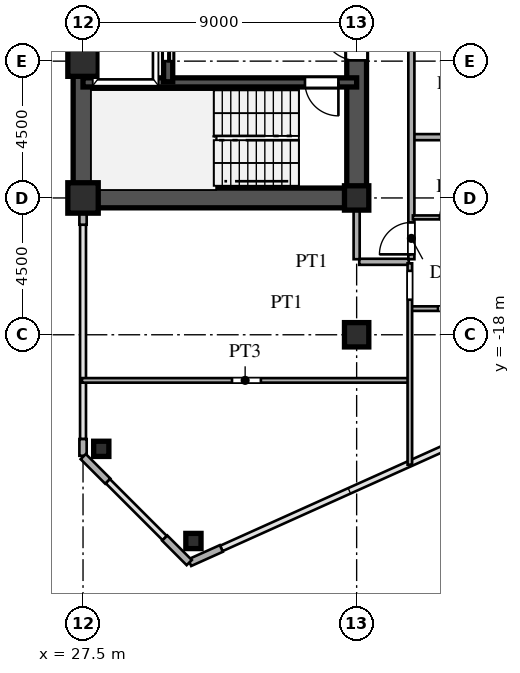
"""IFC4 building model, lengths in metres.
Left out: names, types, materials, properties, quantities, classifications, styles, units other than length and angle.
Written with IfcOpenShell. Run it as: python <this file> out.ifc"""

import sys

from ifc_helpers import new_model, si_unit, direction, frame, frame_2d, origin, origin_2d, place, context, subcontext, project, spatial, rectangle, hollow_rectangle, i_section, extrude, source, transform, mapped, element, fill, save


model = new_model("IFC4")
c1 = context("Model", 3, precision=1e-05, world=origin(), true_north=direction((0.0, 1.0)))
c2 = subcontext(c1, "Body", "Model", "MODEL_VIEW")
j1 = project(units=[si_unit("LENGTHUNIT", "METRE"), si_unit("PLANEANGLEUNIT", "RADIAN")], contexts=[c1])
p1 = place(None, origin())
s1 = spatial("IfcSite", under=j1, at=p1, CompositionType="ELEMENT")
p2 = place(p1, origin())
s2 = spatial("IfcBuilding", under=s1, at=p2, CompositionType="ELEMENT")
p3 = place(p2, frame((0.0, 0.0, 80.1)))
s3 = spatial("IfcBuildingStorey", under=s2, at=p3, CompositionType="ELEMENT", Elevation=80.1)
m1 = source(origin(), c2, "Body", "SweptSolid", [
    extrude(hollow_rectangle(XDim=1.0, YDim=1.0, WallThickness=0.042, at=origin_2d()), origin(), (0.0, 0.0, 1.0), 3.6),
])
for number, where, z_axis, x_axis in (
    (1, (27.5, -13.5, 0.0), (0.0, 0.0, 1.0), (1.0, 0.0, 0.0)),
    (2, (27.5, -9.0, 0.0), (0.0, 0.0, 1.0), (1.0, 0.0, 0.0)),
):
    element("IfcColumn", number, at=place(p3, frame(where, z_axis=z_axis, x_axis=x_axis)), inside=s3, PredefinedType="COLUMN", context=c2, shape_type="MappedRepresentation", body=[
        mapped(m1, transform((0.0, 0.0, 0.0), scale=1.0)),
    ])
m2 = source(origin(), c2, "Body", "SweptSolid", [
    extrude(i_section(OverallWidth=0.8, OverallDepth=0.8, WebThickness=0.032, FlangeThickness=0.05, at=origin_2d()), origin(), (0.0, 0.0, 1.0), 3.6),
])
for number, where, z_axis, x_axis in (
    (3, (36.5, -18.0, 0.0), (0.0, 0.0, 1.0), (1.0, 0.0, 0.0)),
    (4, (36.5, -13.5, 0.0), (0.0, 0.0, 1.0), (1.0, 0.0, 0.0)),
):
    element("IfcColumn", number, at=place(p3, frame(where, z_axis=z_axis, x_axis=x_axis)), inside=s3, PredefinedType="COLUMN", context=c2, shape_type="MappedRepresentation", body=[
        mapped(m2, transform((0.0, 0.0, 0.0), scale=1.0)),
    ])
m3 = source(origin(), c2, "Body", "SweptSolid", [
    extrude(hollow_rectangle(XDim=0.5, YDim=0.5, WallThickness=0.02, at=origin_2d()), origin(), (0.0, 0.0, 1.0), 3.6),
])
for number, where, z_axis, x_axis in (
    (5, (31.131, -24.783, 0.0), (0.0, 0.0, 1.0), (1.0, 0.0, 0.0)),
    (6, (28.1, -21.751, 0.0), (0.0, 0.0, 1.0), (1.0, 0.0, 0.0)),
):
    element("IfcColumn", number, at=place(p3, frame(where, z_axis=z_axis, x_axis=x_axis)), inside=s3, PredefinedType="COLUMN", context=c2, shape_type="MappedRepresentation", body=[
        mapped(m3, transform((0.0, 0.0, 0.0), scale=1.0)),
    ])
p4 = place(p3, frame((31.009, -25.496, 0.0), z_axis=(0.0, 0.0, 1.0), x_axis=(0.911929519623, 0.410346866979, 0.0)))
e7 = element("IfcWall", 7, at=p4, inside=s3, PredefinedType="SOLIDWALL", context=c2, shape_type="SweptSolid", body=[
    extrude(rectangle(XDim=1.14, YDim=0.24, at=frame_2d((0.57, 0.0))), origin(), (0.0, 0.0, 1.0), 3.38),
])
p5 = place(p3, frame((27.5, -21.98, 0.0), z_axis=(0.0, 0.0, 1.0), x_axis=(0.0, 1.0, 0.0)))
e8 = element("IfcWall", 8, at=p5, inside=s3, PredefinedType="SOLIDWALL", context=c2, shape_type="SweptSolid", body=[
    extrude(rectangle(XDim=0.55, YDim=0.24, at=frame_2d((0.275, 0.0))), origin(), (0.0, 0.0, 1.0), 3.38),
])
p6 = place(p3, frame((27.5, -14.38, 0.0), z_axis=(0.0, 0.0, 1.0), x_axis=(0.0, 1.0, 0.0)))
e9 = element("IfcWall", 9, at=p6, inside=s3, PredefinedType="SOLIDWALL", context=c2, shape_type="SweptSolid", body=[
    extrude(rectangle(XDim=0.55, YDim=0.24, at=frame_2d((0.275, 0.0))), origin(), (0.0, 0.0, 1.0), 2.88),
])
for number, where, z_axis, x_axis in (
    (10, (27.507, -22.007, 0.0), (0.0, 0.0, 1.0), (0.707, -0.707, 0.0)),
    (11, (30.187, -24.687, 0.0), (0.0, 0.0, 1.0), (0.707, -0.707, 0.0)),
):
    element("IfcWall", number, at=place(p3, frame(where, z_axis=z_axis, x_axis=x_axis)), inside=s3, PredefinedType="SOLIDWALL", context=c2, shape_type="SweptSolid", body=[
        extrude(rectangle(XDim=1.14, YDim=0.24, at=frame_2d((0.57, 0.0))), origin(), (0.0, 0.0, 1.0), 3.38),
    ])
p7 = place(p3, frame((27.5, -13.5, 0.0), z_axis=(0.0, 0.0, 1.0), x_axis=(0.0, 1.0, 0.0)))
e12 = element("IfcWall", 12, at=p7, inside=s3, PredefinedType="SHEAR", context=c2, shape_type="SweptSolid", body=[
    extrude(rectangle(XDim=12.2, YDim=0.65, at=frame_2d((6.1, 0.0))), origin(), (0.0, 0.0, 1.0), 3.38),
])
p8 = place(p3, frame((27.5, -13.5, 0.0), z_axis=(0.0, 0.0, 1.0), x_axis=(1.0, 0.0, 0.0)))
e13 = element("IfcWall", 13, at=p8, inside=s3, PredefinedType="SHEAR", context=c2, shape_type="SweptSolid", body=[
    extrude(rectangle(XDim=9.0, YDim=0.65, at=frame_2d((4.5, 0.0))), origin(), (0.0, 0.0, 1.0), 3.38),
])
p9 = place(p3, frame((36.5, -13.65, 0.0), z_axis=(0.0, 0.0, 1.0), x_axis=(0.0, 1.0, 0.0)))
e14 = element("IfcWall", 14, at=p9, inside=s3, PredefinedType="SHEAR", context=c2, shape_type="SweptSolid", body=[
    extrude(rectangle(XDim=7.15, YDim=0.65, at=frame_2d((3.575, 0.0))), origin(), (0.0, 0.0, 1.0), 3.38),
])
p10 = place(p9, frame((4.675, 0.0, 0.0)))
e15 = element("IfcOpeningElement", 15, at=p10, cuts=e14, PredefinedType="OPENING", context=c2, shape_type="SweptSolid", body=[
    extrude(rectangle(XDim=1.15, YDim=2.2, at=frame_2d((0.575, 1.1))), frame((0.0, 0.335, 0.0), z_axis=(0.0, -1.0, 0.0), x_axis=(1.0, 0.0, 0.0)), (0.0, 0.0, 1.0), 0.67),
])
p11 = place(p3, frame((27.5, -9.7, 0.0), z_axis=(0.0, 0.0, 1.0), x_axis=(1.0, 0.0, 0.0)))
e16 = element("IfcWall", 16, at=p11, inside=s3, PredefinedType="SHEAR", context=c2, shape_type="SweptSolid", body=[
    extrude(rectangle(XDim=9.0, YDim=0.3, at=frame_2d((4.5, 0.0))), origin(), (0.0, 0.0, 1.0), 3.38),
])
p12 = place(p11, frame((7.3, 0.0, 0.0)))
e17 = element("IfcOpeningElement", 17, at=p12, cuts=e16, PredefinedType="OPENING", context=c2, shape_type="SweptSolid", body=[
    extrude(rectangle(XDim=1.1, YDim=2.2, at=frame_2d((0.55, 1.1))), frame((0.0, 0.16, 0.0), z_axis=(0.0, -1.0, 0.0), x_axis=(1.0, 0.0, 0.0)), (0.0, 0.0, 1.0), 0.32),
])
p13 = place(p3, frame((30.3, -9.68, 0.0), z_axis=(0.0, 0.0, 1.0), x_axis=(0.0, 1.0, 0.0)))
e18 = element("IfcWall", 18, at=p13, inside=s3, PredefinedType="SHEAR", context=c2, shape_type="SweptSolid", body=[
    extrude(rectangle(XDim=2.56, YDim=0.3, at=frame_2d((1.28, 0.0))), origin(), (0.0, 0.0, 1.0), 3.38),
])
p14 = place(p13, frame((0.68, 0.0, 0.0)))
e19 = element("IfcOpeningElement", 19, at=p14, cuts=e18, PredefinedType="OPENING", context=c2, shape_type="SweptSolid", body=[
    extrude(rectangle(XDim=1.2, YDim=2.25, at=frame_2d((0.6, 1.125))), frame((0.0, 0.16, 0.0), z_axis=(0.0, -1.0, 0.0), x_axis=(1.0, 0.0, 0.0)), (0.0, 0.0, 1.0), 0.32),
])
p15 = place(p3, frame((27.465, -19.5, 0.0), z_axis=(0.0, 0.0, 1.0), x_axis=(1.0, 0.0, 0.0)))
e20 = element("IfcWall", 20, at=p15, inside=s3, PredefinedType="PARTITIONING", context=c2, shape_type="SweptSolid", body=[
    extrude(rectangle(XDim=10.735, YDim=0.15, at=frame_2d((5.367, 0.0))), origin(), (0.0, 0.0, 1.0), 3.38),
])
p16 = place(p15, frame((4.935, 0.0, 0.0)))
e21 = element("IfcOpeningElement", 21, at=p16, cuts=e20, PredefinedType="OPENING", context=c2, shape_type="SweptSolid", body=[
    extrude(rectangle(XDim=0.95, YDim=2.15, at=frame_2d((0.475, 1.075))), frame((0.0, 0.085, 0.0), z_axis=(0.0, -1.0, 0.0), x_axis=(1.0, 0.0, 0.0)), (0.0, 0.0, 1.0), 0.17),
])
p17 = place(p3, frame((38.3, -17.14, 0.0), z_axis=(0.0, 0.0, 1.0), x_axis=(1.0, 0.0, 0.0)))
e22 = element("IfcWall", 22, at=p17, inside=s3, PredefinedType="PARTITIONING", context=c2, shape_type="SweptSolid", body=[
    extrude(rectangle(XDim=2.7, YDim=0.15, at=frame_2d((1.35, 0.0))), origin(), (0.0, 0.0, 1.0), 3.38),
])
p18 = place(p17, frame((0.875, 0.0, 0.0)))
e23 = element("IfcOpeningElement", 23, at=p18, cuts=e22, PredefinedType="OPENING", context=c2, shape_type="SweptSolid", body=[
    extrude(rectangle(XDim=0.95, YDim=2.15, at=frame_2d((0.475, 1.075))), frame((0.0, 0.085, 0.0), z_axis=(0.0, -1.0, 0.0), x_axis=(1.0, 0.0, 0.0)), (0.0, 0.0, 1.0), 0.17),
])
p19 = place(p3, frame((36.585, -15.6, 0.0), z_axis=(0.0, 0.0, 1.0), x_axis=(1.0, 0.0, 0.0)))
e24 = element("IfcWall", 24, at=p19, inside=s3, PredefinedType="PARTITIONING", context=c2, shape_type="SweptSolid", body=[
    extrude(rectangle(XDim=1.63, YDim=0.2, at=frame_2d((0.815, 0.0))), origin(), (0.0, 0.0, 1.0), 3.38),
])
p20 = place(p3, frame((38.35, -14.14, 0.0), z_axis=(0.0, 0.0, 1.0), x_axis=(1.0, 0.0, 0.0)))
e25 = element("IfcWall", 25, at=p20, inside=s3, PredefinedType="PARTITIONING", context=c2, shape_type="SweptSolid", body=[
    extrude(rectangle(XDim=2.65, YDim=0.13, at=frame_2d((1.325, 0.0))), origin(), (0.0, 0.0, 1.0), 3.38),
])
p21 = place(p20, frame((0.885, 0.0, 0.0)))
e26 = element("IfcOpeningElement", 26, at=p21, cuts=e25, PredefinedType="OPENING", context=c2, shape_type="SweptSolid", body=[
    extrude(rectangle(XDim=0.88, YDim=2.1, at=frame_2d((0.44, 1.05))), frame((0.0, 0.075, 0.0), z_axis=(0.0, -1.0, 0.0), x_axis=(1.0, 0.0, 0.0)), (0.0, 0.0, 1.0), 0.15),
])
p22 = place(p3, frame((38.38, -11.5, 0.0), z_axis=(0.0, 0.0, 1.0), x_axis=(1.0, 0.0, 0.0)))
e27 = element("IfcWall", 27, at=p22, inside=s3, PredefinedType="PARTITIONING", context=c2, shape_type="SweptSolid", body=[
    extrude(rectangle(XDim=23.743, YDim=0.2, at=frame_2d((11.872, 0.0))), origin(), (0.0, 0.0, 1.0), 3.38),
])
p23 = place(p3, frame((36.5, -15.515, 0.0), z_axis=(0.0, 0.0, 1.0), x_axis=(0.0, 1.0, 0.0)))
e28 = element("IfcWall", 28, at=p23, inside=s3, PredefinedType="PARTITIONING", context=c2, shape_type="SweptSolid", body=[
    extrude(rectangle(XDim=1.685, YDim=0.2, at=frame_2d((0.842, 0.0))), origin(), (0.0, 0.0, 1.0), 2.68),
])
p24 = place(p3, frame((38.25, -22.273, 0.0), z_axis=(0.0, 0.0, 1.0), x_axis=(0.0, 1.0, 0.0)))
e29 = element("IfcWall", 29, at=p24, inside=s3, PredefinedType="PARTITIONING", context=c2, shape_type="SweptSolid", body=[
    extrude(rectangle(XDim=6.623, YDim=0.15, at=frame_2d((3.312, 0.0))), origin(), (0.0, 0.0, 1.0), 3.38),
])
p25 = place(p24, frame((5.426, 0.0, 0.0)))
e30 = element("IfcOpeningElement", 30, at=p25, cuts=e29, PredefinedType="OPENING", context=c2, shape_type="SweptSolid", body=[
    extrude(rectangle(XDim=0.95, YDim=2.15, at=frame_2d((0.475, 1.075))), frame((0.0, 0.085, 0.0), z_axis=(0.0, -1.0, 0.0), x_axis=(1.0, 0.0, 0.0)), (0.0, 0.0, 1.0), 0.17),
])
p26 = place(p3, frame((38.3, -15.515, 0.0), z_axis=(0.0, 0.0, 1.0), x_axis=(0.0, 1.0, 0.0)))
e31 = element("IfcWall", 31, at=p26, inside=s3, PredefinedType="PARTITIONING", context=c2, shape_type="SweptSolid", body=[
    extrude(rectangle(XDim=31.03, YDim=0.2, at=frame_2d((15.515, 0.0))), origin(), (0.0, 0.0, 1.0), 3.38),
])
p27 = place(p26, frame((0.16, 0.0, 0.0)))
e32 = element("IfcOpeningElement", 32, at=p27, cuts=e31, PredefinedType="OPENING", context=c2, shape_type="SweptSolid", body=[
    extrude(rectangle(XDim=1.05, YDim=2.25, at=frame_2d((0.525, 1.125))), frame((0.0, 0.11, 0.0), z_axis=(0.0, -1.0, 0.0), x_axis=(1.0, 0.0, 0.0)), (0.0, 0.0, 1.0), 0.22),
])
p28 = place(p26, frame((9.067, 0.0, 0.0)))
e33 = element("IfcOpeningElement", 33, at=p28, cuts=e31, PredefinedType="OPENING", context=c2, shape_type="SweptSolid", body=[
    extrude(rectangle(XDim=1.05, YDim=2.25, at=frame_2d((0.525, 1.125))), frame((0.0, 0.11, 0.0), z_axis=(0.0, -1.0, 0.0), x_axis=(1.0, 0.0, 0.0)), (0.0, 0.0, 1.0), 0.22),
])
p29 = place(p26, frame((20.325, 0.0, 0.0)))
e34 = element("IfcOpeningElement", 34, at=p29, cuts=e31, PredefinedType="OPENING", context=c2, shape_type="SweptSolid", body=[
    extrude(rectangle(XDim=1.05, YDim=2.25, at=frame_2d((0.525, 1.125))), frame((0.0, 0.11, 0.0), z_axis=(0.0, -1.0, 0.0), x_axis=(1.0, 0.0, 0.0)), (0.0, 0.0, 1.0), 0.22),
])
p30 = place(p26, frame((29.613, 0.0, 0.0)))
e35 = element("IfcOpeningElement", 35, at=p30, cuts=e31, PredefinedType="OPENING", context=c2, shape_type="SweptSolid", body=[
    extrude(rectangle(XDim=1.05, YDim=2.25, at=frame_2d((0.525, 1.125))), frame((0.0, 0.11, 0.0), z_axis=(0.0, -1.0, 0.0), x_axis=(1.0, 0.0, 0.0)), (0.0, 0.0, 1.0), 0.22),
])
m4 = source(origin(), c2, "Body", "SweptSolid", [
    extrude(rectangle(XDim=1.15, YDim=2.2, at=frame_2d((0.575, 1.1))), frame((0.0, 0.025, 0.0), z_axis=(0.0, -1.0, 0.0), x_axis=(1.0, 0.0, 0.0)), (0.0, 0.0, 1.0), 0.05),
])
p31 = place(p10, origin())
e36 = element("IfcDoor", 36, at=p31, inside=s3, OperationType="SINGLE_SWING_RIGHT", PredefinedType="DOOR", context=c2, shape_type="MappedRepresentation", body=[
    mapped(m4, transform((0.0, 0.0, 0.0), scale=1.0)),
])
fill(e15, e36)
m5 = source(origin(), c2, "Body", "SweptSolid", [
    extrude(rectangle(XDim=1.1, YDim=2.2, at=frame_2d((0.55, 1.1))), frame((0.0, 0.025, 0.0), z_axis=(0.0, -1.0, 0.0), x_axis=(1.0, 0.0, 0.0)), (0.0, 0.0, 1.0), 0.05),
])
p32 = place(p12, frame((1.1, 0.0, 0.0), z_axis=(0.0, 0.0, 1.0), x_axis=(-1.0, 0.0, 0.0)))
e37 = element("IfcDoor", 37, at=p32, inside=s3, OperationType="SINGLE_SWING_RIGHT", PredefinedType="DOOR", context=c2, shape_type="MappedRepresentation", body=[
    mapped(m5, transform((0.0, 0.0, 0.0), scale=1.0)),
])
fill(e17, e37)
m6 = source(origin(), c2, "Body", "SweptSolid", [
    extrude(rectangle(XDim=1.2, YDim=2.25, at=frame_2d((0.6, 1.125))), frame((0.0, 0.025, 0.0), z_axis=(0.0, -1.0, 0.0), x_axis=(1.0, 0.0, 0.0)), (0.0, 0.0, 1.0), 0.05),
])
p33 = place(p14, origin())
e38 = element("IfcDoor", 38, at=p33, inside=s3, OperationType="DOUBLE_DOOR_SLIDING", PredefinedType="DOOR", context=c2, shape_type="MappedRepresentation", body=[
    mapped(m6, transform((0.0, 0.0, 0.0), scale=1.0)),
])
fill(e19, e38)
m7 = source(origin(), c2, "Body", "SweptSolid", [
    extrude(rectangle(XDim=0.88, YDim=2.1, at=frame_2d((0.44, 1.05))), frame((0.0, 0.025, 0.0), z_axis=(0.0, -1.0, 0.0), x_axis=(1.0, 0.0, 0.0)), (0.0, 0.0, 1.0), 0.05),
])
p34 = place(p21, origin())
e39 = element("IfcDoor", 39, at=p34, inside=s3, OperationType="SINGLE_SWING_RIGHT", PredefinedType="DOOR", context=c2, shape_type="MappedRepresentation", body=[
    mapped(m7, transform((0.0, 0.0, 0.0), scale=1.0)),
])
fill(e26, e39)
m8 = source(origin(), c2, "Body", "SweptSolid", [
    extrude(rectangle(XDim=1.05, YDim=2.25, at=frame_2d((0.525, 1.125))), frame((0.0, 0.025, 0.0), z_axis=(0.0, -1.0, 0.0), x_axis=(1.0, 0.0, 0.0)), (0.0, 0.0, 1.0), 0.05),
])
p35 = place(p27, origin())
e40 = element("IfcDoor", 40, at=p35, inside=s3, OperationType="SINGLE_SWING_LEFT", PredefinedType="DOOR", context=c2, shape_type="MappedRepresentation", body=[
    mapped(m8, transform((0.0, 0.0, 0.0), scale=1.0)),
])
fill(e32, e40)
save(model, sys.argv[1])
